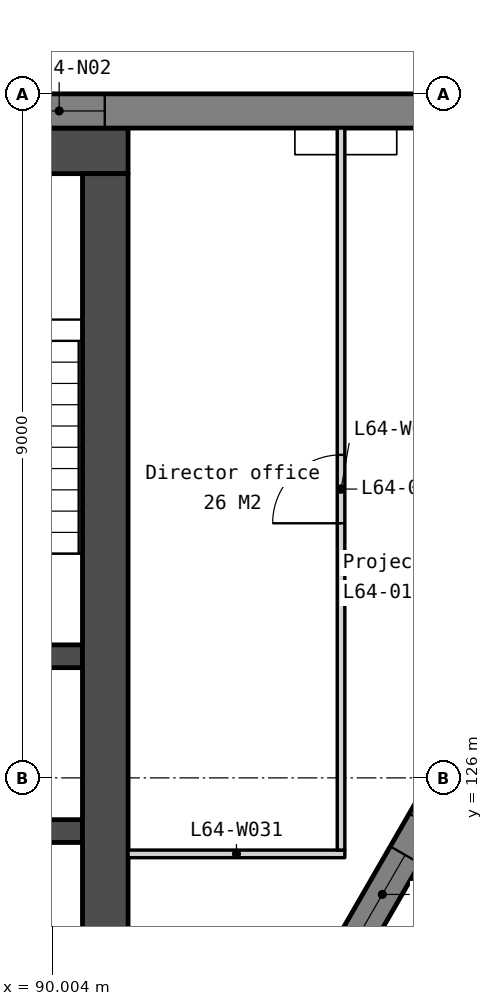
"""IFC4 building model, lengths in metres.
Left out: names, types, materials, properties, quantities, classifications, styles, units other than length and angle.
Written with IfcOpenShell. Run it as: python <this file> out.ifc"""

import sys

from ifc_helpers import new_model, si_unit, direction, frame, frame_2d, origin, place, context, subcontext, project, spatial, polyline, rectangle, outline, extrude, element, fill, save


model = new_model("IFC4")
c1 = context("Model", 3, precision=1e-05, world=origin(), true_north=direction((0.0, 1.0)))
c2 = subcontext(c1, "Body", "Model", "MODEL_VIEW")
j1 = project(units=[si_unit("LENGTHUNIT", "METRE"), si_unit("PLANEANGLEUNIT", "RADIAN")], contexts=[c1])
p1 = place(None, origin())
s1 = spatial("IfcSite", under=j1, at=p1, CompositionType="ELEMENT")
p2 = place(p1, origin())
s2 = spatial("IfcBuilding", under=s1, at=p2, CompositionType="ELEMENT")
p3 = place(p2, frame((0.0, 0.0, 262.1)))
s3 = spatial("IfcBuildingStorey", under=s2, at=p3, CompositionType="ELEMENT", Elevation=262.1)
p4 = place(p3, frame((69.0, 134.25, 0.0), z_axis=(0.0, 0.0, 1.0), x_axis=(1.0, 0.0, 0.0)))
e1 = element("IfcWall", 1, at=p4, inside=s3, PredefinedType="SOLIDWALL", context=c2, shape_type="SweptSolid", body=[
    extrude(rectangle(XDim=22.0, YDim=0.6, at=frame_2d((11.0, 0.0))), origin(), (0.0, 0.0, 1.0), 3.75),
])
for number, where, z_axis, x_axis in (
    (2, (87.85, 127.6, 0.0), (0.0, 0.0, 1.0), (1.0, 0.0, 0.0)),
    (3, (87.85, 125.3, 0.0), (0.0, 0.0, 1.0), (1.0, 0.0, 0.0)),
):
    element("IfcWall", number, at=place(p3, frame(where, z_axis=z_axis, x_axis=x_axis)), inside=s3, PredefinedType="SOLIDWALL", context=c2, shape_type="SweptSolid", body=[
        extrude(rectangle(XDim=2.55, YDim=0.3, at=frame_2d((1.275, 0.0))), origin(), (0.0, 0.0, 1.0), 3.75),
    ])
p5 = place(p3, frame((90.7, 133.95, 0.0), z_axis=(0.0, 0.0, 1.0), x_axis=(0.0, -1.0, 0.0)))
e4 = element("IfcWall", 4, at=p5, inside=s3, PredefinedType="SOLIDWALL", context=c2, shape_type="SweptSolid", body=[
    extrude(rectangle(XDim=10.8, YDim=0.6, at=frame_2d((5.4, 0.0))), origin(), (0.0, 0.0, 1.0), 3.75),
])
p6 = place(p3, frame((98.486, 134.775, -0.15), z_axis=(0.0, 0.0, 1.0), x_axis=(-1.0, 0.0, 0.0)))
e5 = element("IfcWall", 5, at=p6, inside=s3, PredefinedType="SOLIDWALL", context=c2, shape_type="SweptSolid", body=[
    extrude(outline(polyline([(36.972, 0.0), (36.972, 3.9), (0.0, 3.9), (0.0, 0.0), (36.972, 0.0)])), frame((0.0, 0.225, 0.0), z_axis=(0.0, -1.0, 0.0), x_axis=(1.0, 0.0, 0.0)), (0.0, 0.0, 1.0), 0.45),
])
p7 = place(p6, frame((0.744, 0.0, 0.95)))
e6 = element("IfcOpeningElement", 6, at=p7, cuts=e5, PredefinedType="OPENING", context=c2, shape_type="SweptSolid", body=[
    extrude(rectangle(XDim=1.2, YDim=2.2, at=frame_2d((0.6, 1.1))), frame((0.0, 0.235, 0.0), z_axis=(0.0, -1.0, 0.0), x_axis=(1.0, 0.0, 0.0)), (0.0, 0.0, 1.0), 0.47),
])
p8 = place(p6, frame((7.793, 0.0, 0.95)))
e7 = element("IfcOpeningElement", 7, at=p8, cuts=e5, PredefinedType="OPENING", context=c2, shape_type="SweptSolid", body=[
    extrude(rectangle(XDim=1.2, YDim=2.2, at=frame_2d((0.6, 1.1))), frame((0.0, 0.235, 0.0), z_axis=(0.0, -1.0, 0.0), x_axis=(1.0, 0.0, 0.0)), (0.0, 0.0, 1.0), 0.47),
])
p9 = place(p6, frame((9.493, 0.0, 0.95)))
e8 = element("IfcOpeningElement", 8, at=p9, cuts=e5, PredefinedType="OPENING", context=c2, shape_type="SweptSolid", body=[
    extrude(rectangle(XDim=1.2, YDim=2.2, at=frame_2d((0.6, 1.1))), frame((0.0, 0.235, 0.0), z_axis=(0.0, -1.0, 0.0), x_axis=(1.0, 0.0, 0.0)), (0.0, 0.0, 1.0), 0.47),
])
p10 = place(p6, frame((17.036, 0.0, 0.95)))
e9 = element("IfcOpeningElement", 9, at=p10, cuts=e5, PredefinedType="OPENING", context=c2, shape_type="SweptSolid", body=[
    extrude(rectangle(XDim=1.2, YDim=2.2, at=frame_2d((0.6, 1.1))), frame((0.0, 0.235, 0.0), z_axis=(0.0, -1.0, 0.0), x_axis=(1.0, 0.0, 0.0)), (0.0, 0.0, 1.0), 0.47),
])
p11 = place(p6, frame((18.736, 0.0, 0.95)))
e10 = element("IfcOpeningElement", 10, at=p11, cuts=e5, PredefinedType="OPENING", context=c2, shape_type="SweptSolid", body=[
    extrude(rectangle(XDim=1.2, YDim=2.2, at=frame_2d((0.6, 1.1))), frame((0.0, 0.235, 0.0), z_axis=(0.0, -1.0, 0.0), x_axis=(1.0, 0.0, 0.0)), (0.0, 0.0, 1.0), 0.47),
])
p12 = place(p6, frame((26.279, 0.0, 0.95)))
e11 = element("IfcOpeningElement", 11, at=p12, cuts=e5, PredefinedType="OPENING", context=c2, shape_type="SweptSolid", body=[
    extrude(rectangle(XDim=1.2, YDim=2.2, at=frame_2d((0.6, 1.1))), frame((0.0, 0.235, 0.0), z_axis=(0.0, -1.0, 0.0), x_axis=(1.0, 0.0, 0.0)), (0.0, 0.0, 1.0), 0.47),
])
p13 = place(p6, frame((27.979, 0.0, 0.95)))
e12 = element("IfcOpeningElement", 12, at=p13, cuts=e5, PredefinedType="OPENING", context=c2, shape_type="SweptSolid", body=[
    extrude(rectangle(XDim=1.2, YDim=2.2, at=frame_2d((0.6, 1.1))), frame((0.0, 0.235, 0.0), z_axis=(0.0, -1.0, 0.0), x_axis=(1.0, 0.0, 0.0)), (0.0, 0.0, 1.0), 0.47),
])
p14 = place(p6, frame((35.028, 0.0, 0.95)))
e13 = element("IfcOpeningElement", 13, at=p14, cuts=e5, PredefinedType="OPENING", context=c2, shape_type="SweptSolid", body=[
    extrude(rectangle(XDim=1.2, YDim=2.2, at=frame_2d((0.6, 1.1))), frame((0.0, 0.235, 0.0), z_axis=(0.0, -1.0, 0.0), x_axis=(1.0, 0.0, 0.0)), (0.0, 0.0, 1.0), 0.47),
])
p15 = place(p3, frame((80.905, 101.188, -0.15), z_axis=(0.0, 0.0, 1.0), x_axis=(0.500002536638, 0.866023939251, 0.0)))
e14 = element("IfcWall", 14, at=p15, inside=s3, PredefinedType="SOLIDWALL", context=c2, shape_type="SweptSolid", body=[
    extrude(outline(polyline([(36.972, 0.0), (36.972, 3.9), (0.0, 3.9), (0.0, 0.0), (36.972, 0.0)])), frame((0.0, 0.225, 0.0), z_axis=(0.0, -1.0, 0.0), x_axis=(1.0, 0.0, 0.0)), (0.0, 0.0, 1.0), 0.45),
])
p16 = place(p15, frame((0.744, 0.0, 0.95)))
e15 = element("IfcOpeningElement", 15, at=p16, cuts=e14, PredefinedType="OPENING", context=c2, shape_type="SweptSolid", body=[
    extrude(rectangle(XDim=1.2, YDim=2.2, at=frame_2d((0.6, 1.1))), frame((0.0, 0.235, 0.0), z_axis=(0.0, -1.0, 0.0), x_axis=(1.0, 0.0, 0.0)), (0.0, 0.0, 1.0), 0.47),
])
p17 = place(p15, frame((7.793, 0.0, 0.95)))
e16 = element("IfcOpeningElement", 16, at=p17, cuts=e14, PredefinedType="OPENING", context=c2, shape_type="SweptSolid", body=[
    extrude(rectangle(XDim=1.2, YDim=2.2, at=frame_2d((0.6, 1.1))), frame((0.0, 0.235, 0.0), z_axis=(0.0, -1.0, 0.0), x_axis=(1.0, 0.0, 0.0)), (0.0, 0.0, 1.0), 0.47),
])
p18 = place(p15, frame((9.493, 0.0, 0.95)))
e17 = element("IfcOpeningElement", 17, at=p18, cuts=e14, PredefinedType="OPENING", context=c2, shape_type="SweptSolid", body=[
    extrude(rectangle(XDim=1.2, YDim=2.2, at=frame_2d((0.6, 1.1))), frame((0.0, 0.235, 0.0), z_axis=(0.0, -1.0, 0.0), x_axis=(1.0, 0.0, 0.0)), (0.0, 0.0, 1.0), 0.47),
])
p19 = place(p15, frame((17.036, 0.0, 0.95)))
e18 = element("IfcOpeningElement", 18, at=p19, cuts=e14, PredefinedType="OPENING", context=c2, shape_type="SweptSolid", body=[
    extrude(rectangle(XDim=1.2, YDim=2.2, at=frame_2d((0.6, 1.1))), frame((0.0, 0.235, 0.0), z_axis=(0.0, -1.0, 0.0), x_axis=(1.0, 0.0, 0.0)), (0.0, 0.0, 1.0), 0.47),
])
p20 = place(p15, frame((18.736, 0.0, 0.95)))
e19 = element("IfcOpeningElement", 19, at=p20, cuts=e14, PredefinedType="OPENING", context=c2, shape_type="SweptSolid", body=[
    extrude(rectangle(XDim=1.2, YDim=2.2, at=frame_2d((0.6, 1.1))), frame((0.0, 0.235, 0.0), z_axis=(0.0, -1.0, 0.0), x_axis=(1.0, 0.0, 0.0)), (0.0, 0.0, 1.0), 0.47),
])
p21 = place(p15, frame((26.279, 0.0, 0.95)))
e20 = element("IfcOpeningElement", 20, at=p21, cuts=e14, PredefinedType="OPENING", context=c2, shape_type="SweptSolid", body=[
    extrude(rectangle(XDim=1.2, YDim=2.2, at=frame_2d((0.6, 1.1))), frame((0.0, 0.235, 0.0), z_axis=(0.0, -1.0, 0.0), x_axis=(1.0, 0.0, 0.0)), (0.0, 0.0, 1.0), 0.47),
])
p22 = place(p15, frame((27.979, 0.0, 0.95)))
e21 = element("IfcOpeningElement", 21, at=p22, cuts=e14, PredefinedType="OPENING", context=c2, shape_type="SweptSolid", body=[
    extrude(rectangle(XDim=1.2, YDim=2.2, at=frame_2d((0.6, 1.1))), frame((0.0, 0.235, 0.0), z_axis=(0.0, -1.0, 0.0), x_axis=(1.0, 0.0, 0.0)), (0.0, 0.0, 1.0), 0.47),
])
p23 = place(p15, frame((35.028, 0.0, 0.95)))
e22 = element("IfcOpeningElement", 22, at=p23, cuts=e14, PredefinedType="OPENING", context=c2, shape_type="SweptSolid", body=[
    extrude(rectangle(XDim=1.2, YDim=2.2, at=frame_2d((0.6, 1.1))), frame((0.0, 0.235, 0.0), z_axis=(0.0, -1.0, 0.0), x_axis=(1.0, 0.0, 0.0)), (0.0, 0.0, 1.0), 0.47),
])
p24 = place(p3, frame((91.0, 125.0, 0.0), z_axis=(0.0, 0.0, 1.0), x_axis=(1.0, 0.0, 0.0)))
e23 = element("IfcWall", 23, at=p24, inside=s3, PredefinedType="PARTITIONING", context=c2, shape_type="SweptSolid", body=[
    extrude(rectangle(XDim=2.852, YDim=0.1, at=frame_2d((1.426, 0.0))), origin(), (0.0, 0.0, 1.0), 3.75),
])
p25 = place(p3, frame((93.802, 125.05, 0.0), z_axis=(0.0, 0.0, 1.0), x_axis=(0.0, 1.0, 0.0)))
e24 = element("IfcWall", 24, at=p25, inside=s3, PredefinedType="PARTITIONING", context=c2, shape_type="SweptSolid", body=[
    extrude(rectangle(XDim=9.5, YDim=0.1, at=frame_2d((4.75, 0.0))), origin(), (0.0, 0.0, 1.0), 3.75),
])
p26 = place(p25, frame((4.3, 0.0, 0.0)))
e25 = element("IfcOpeningElement", 25, at=p26, cuts=e24, PredefinedType="OPENING", context=c2, shape_type="SweptSolid", body=[
    extrude(rectangle(XDim=0.9, YDim=2.1, at=frame_2d((0.45, 1.05))), frame((0.0, 0.06, 0.0), z_axis=(0.0, -1.0, 0.0), x_axis=(1.0, 0.0, 0.0)), (0.0, 0.0, 1.0), 0.12),
])
p27 = place(p8, origin())
e26 = element("IfcWindow", 26, at=p27, inside=s3, PartitioningType="SINGLE_PANEL", PredefinedType="WINDOW", context=c2, shape_type="SweptSolid", body=[
    extrude(rectangle(XDim=1.2, YDim=2.2, at=frame_2d((0.6, 1.1))), frame((0.0, 0.03, 0.0), z_axis=(0.0, -1.0, 0.0), x_axis=(1.0, 0.0, 0.0)), (0.0, 0.0, 1.0), 0.06),
])
fill(e7, e26)
p28 = place(p21, origin())
e27 = element("IfcWindow", 27, at=p28, inside=s3, PartitioningType="SINGLE_PANEL", PredefinedType="WINDOW", context=c2, shape_type="SweptSolid", body=[
    extrude(rectangle(XDim=1.2, YDim=2.2, at=frame_2d((0.6, 1.1))), frame((0.0, 0.03, 0.0), z_axis=(0.0, -1.0, 0.0), x_axis=(1.0, 0.0, 0.0)), (0.0, 0.0, 1.0), 0.06),
])
fill(e20, e27)
p29 = place(p26, origin())
e28 = element("IfcDoor", 28, at=p29, inside=s3, OperationType="SINGLE_SWING_LEFT", PredefinedType="DOOR", context=c2, shape_type="SweptSolid", body=[
    extrude(rectangle(XDim=0.9, YDim=2.1, at=frame_2d((0.45, 1.05))), frame((0.0, 0.025, 0.0), z_axis=(0.0, -1.0, 0.0), x_axis=(1.0, 0.0, 0.0)), (0.0, 0.0, 1.0), 0.05),
])
fill(e25, e28)
save(model, sys.argv[1])
